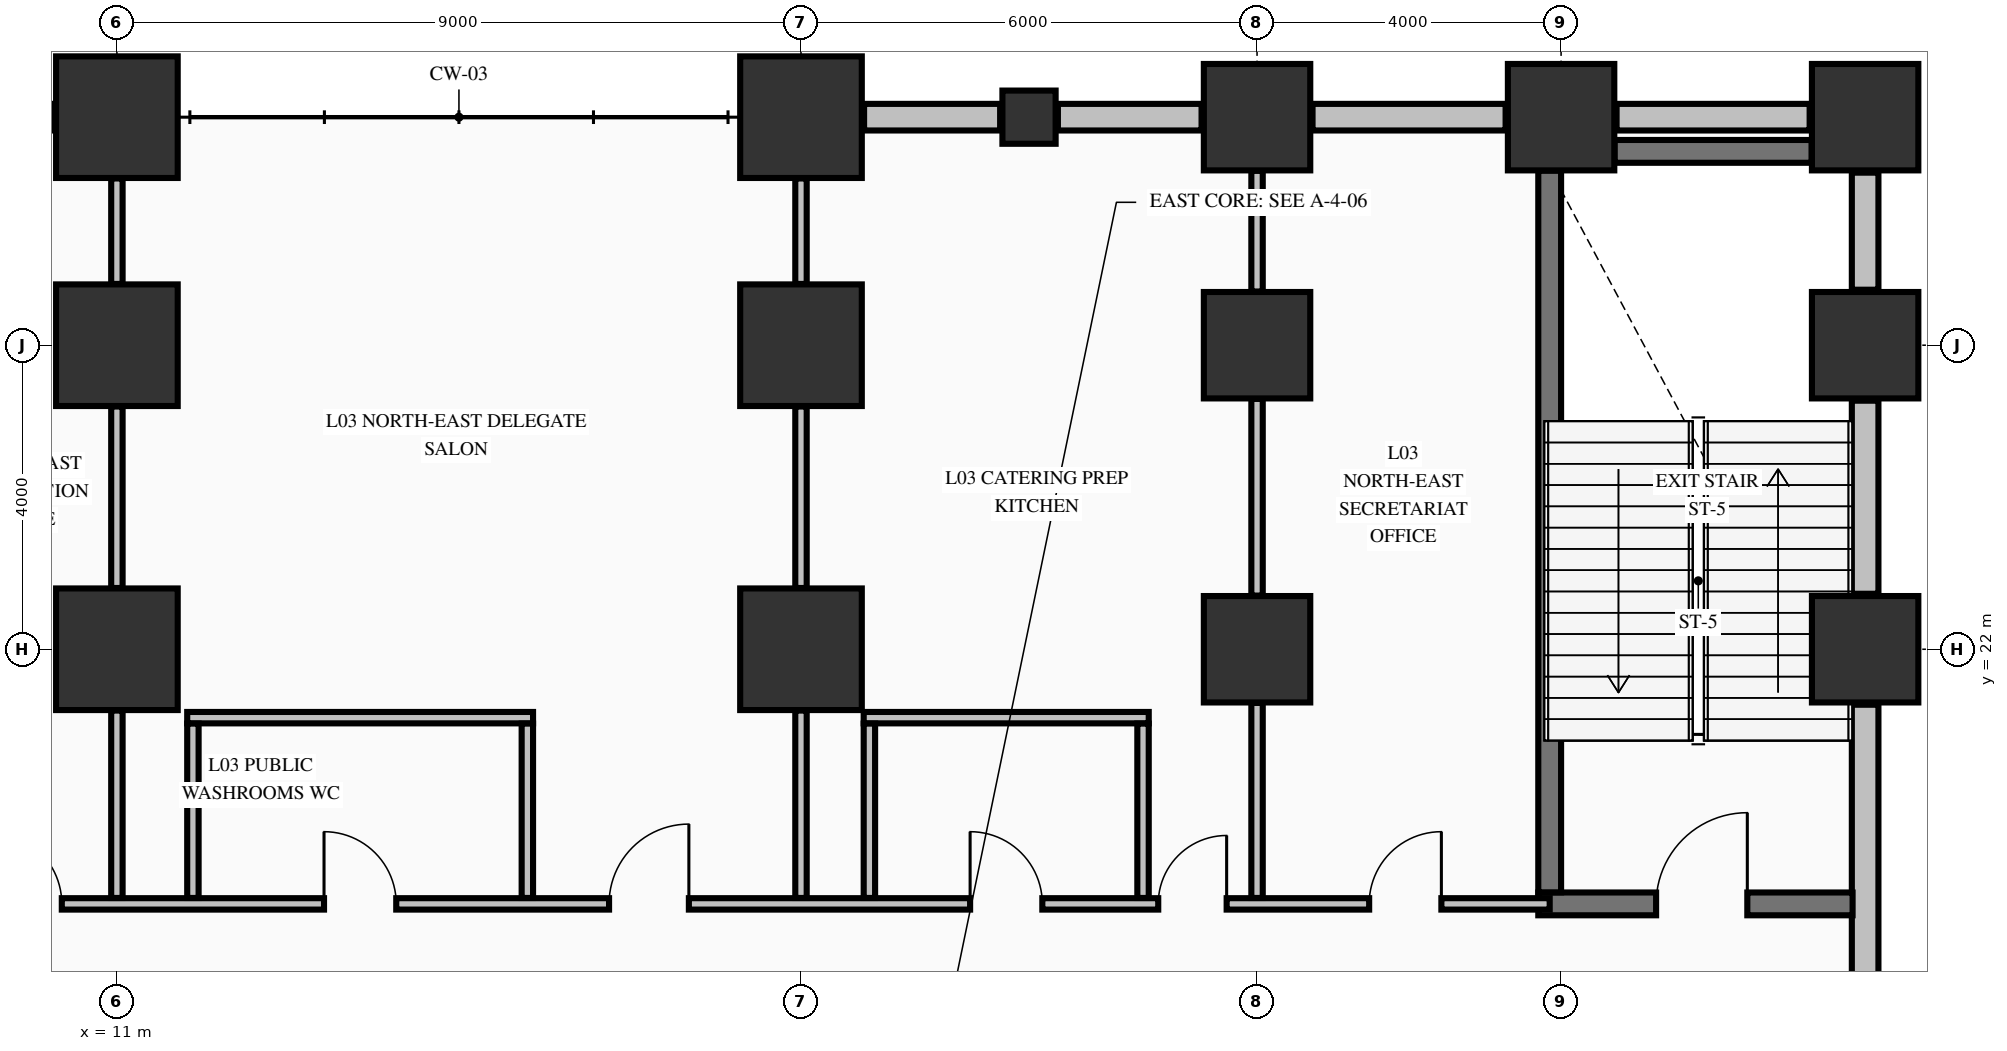
"""IFC4 building model, lengths in metres.
Left out: names, types, materials, properties, quantities, classifications, styles, units other than length and angle.
Written with IfcOpenShell. Run it as: python <this file> out.ifc"""

import sys

from ifc_helpers import new_model, si_unit, direction, frame, frame_2d, origin, origin_2d, place, context, subcontext, project, spatial, rectangle, extrude, element, fill, save


model = new_model("IFC4")
c1 = context("Model", 3, precision=1e-05, world=origin(), true_north=direction((0.0, 1.0)))
c2 = subcontext(c1, "Body", "Model", "MODEL_VIEW")
j1 = project(units=[si_unit("LENGTHUNIT", "METRE"), si_unit("PLANEANGLEUNIT", "RADIAN")], contexts=[c1])
p1 = place(None, origin())
s1 = spatial("IfcSite", under=j1, at=p1, CompositionType="ELEMENT")
p2 = place(p1, origin())
s2 = spatial("IfcBuilding", under=s1, at=p2, CompositionType="ELEMENT")
p3 = place(p2, frame((0.0, 0.0, 16.32)))
s3 = spatial("IfcBuildingStorey", under=s2, at=p3, CompositionType="ELEMENT", Elevation=16.32)
for number, where, z_axis, x_axis in (
    (1, (11.0, 22.0, 0.0), (0.0, 0.0, 1.0), (1.0, 0.0, 0.0)),
    (2, (11.0, 26.0, 0.0), (0.0, 0.0, 1.0), (1.0, 0.0, 0.0)),
    (3, (11.0, 29.0, 0.0), (0.0, 0.0, 1.0), (1.0, 0.0, 0.0)),
    (4, (20.0, 22.0, 0.0), (0.0, 0.0, 1.0), (1.0, 0.0, 0.0)),
    (5, (20.0, 26.0, 0.0), (0.0, 0.0, 1.0), (1.0, 0.0, 0.0)),
    (6, (20.0, 29.0, 0.0), (0.0, 0.0, 1.0), (1.0, 0.0, 0.0)),
):
    element("IfcColumn", number, at=place(p3, frame(where, z_axis=z_axis, x_axis=x_axis)), inside=s3, PredefinedType="COLUMN", context=c2, shape_type="SweptSolid", body=[
        extrude(rectangle(XDim=1.6, YDim=1.6, at=origin_2d()), origin(), (0.0, 0.0, 1.0), 4.99),
    ])
for number, where, z_axis, x_axis in (
    (7, (26.0, 22.0, 0.0), (0.0, 0.0, 1.0), (1.0, 0.0, 0.0)),
    (8, (26.0, 26.0, 0.0), (0.0, 0.0, 1.0), (1.0, 0.0, 0.0)),
    (9, (26.0, 29.0, 0.0), (0.0, 0.0, 1.0), (1.0, 0.0, 0.0)),
    (10, (30.0, 29.0, 0.0), (0.0, 0.0, 1.0), (1.0, 0.0, 0.0)),
    (11, (34.0, 22.0, 0.0), (0.0, 0.0, 1.0), (1.0, 0.0, 0.0)),
    (12, (34.0, 26.0, 0.0), (0.0, 0.0, 1.0), (1.0, 0.0, 0.0)),
    (13, (34.0, 29.0, 0.0), (0.0, 0.0, 1.0), (1.0, 0.0, 0.0)),
):
    element("IfcColumn", number, at=place(p3, frame(where, z_axis=z_axis, x_axis=x_axis)), inside=s3, PredefinedType="COLUMN", context=c2, shape_type="SweptSolid", body=[
        extrude(rectangle(XDim=1.4, YDim=1.4, at=origin_2d()), origin(), (0.0, 0.0, 1.0), 4.99),
    ])
p4 = place(p3, frame((23.0, 29.0, 0.0), z_axis=(0.0, 0.0, 1.0), x_axis=(1.0, 0.0, 0.0)))
e14 = element("IfcColumn", 14, at=p4, inside=s3, PredefinedType="PILASTER", context=c2, shape_type="SweptSolid", body=[
    extrude(rectangle(XDim=0.7, YDim=0.7, at=origin_2d()), origin(), (0.0, 0.0, 1.0), 4.99),
])
p5 = place(p3, frame((10.17, 29.0, 0.0), z_axis=(0.0, 0.0, 1.0), x_axis=(-1.0, 0.0, 0.0)))
e15 = element("IfcWall", 15, at=p5, inside=s3, PredefinedType="STANDARD", context=c2, shape_type="SweptSolid", body=[
    extrude(rectangle(XDim=0.94, YDim=0.35, at=frame_2d((0.47, 0.0))), origin(), (0.0, 0.0, 1.0), 3.332),
])
p6 = place(p3, frame((22.62, 29.0, 0.0), z_axis=(0.0, 0.0, 1.0), x_axis=(-1.0, 0.0, 0.0)))
e16 = element("IfcWall", 16, at=p6, inside=s3, PredefinedType="STANDARD", context=c2, shape_type="SweptSolid", body=[
    extrude(rectangle(XDim=1.79, YDim=0.35, at=frame_2d((0.895, 0.0))), origin(), (0.0, 0.0, 1.0), 3.332),
])
p7 = place(p3, frame((25.27, 29.0, 0.0), z_axis=(0.0, 0.0, 1.0), x_axis=(-1.0, 0.0, 0.0)))
e17 = element("IfcWall", 17, at=p7, inside=s3, PredefinedType="STANDARD", context=c2, shape_type="SweptSolid", body=[
    extrude(rectangle(XDim=1.89, YDim=0.35, at=frame_2d((0.945, 0.0))), origin(), (0.0, 0.0, 1.0), 3.332),
])
for number, where, z_axis, x_axis in (
    (18, (29.27, 29.0, 0.0), (0.0, 0.0, 1.0), (-1.0, 0.0, 0.0)),
    (19, (33.27, 29.0, 0.0), (0.0, 0.0, 1.0), (-1.0, 0.0, 0.0)),
):
    element("IfcWall", number, at=place(p3, frame(where, z_axis=z_axis, x_axis=x_axis)), inside=s3, PredefinedType="STANDARD", context=c2, shape_type="SweptSolid", body=[
        extrude(rectangle(XDim=2.54, YDim=0.35, at=frame_2d((1.27, 0.0))), origin(), (0.0, 0.0, 1.0), 3.332),
    ])
p8 = place(p3, frame((34.0, 21.27, 0.0), z_axis=(0.0, 0.0, 1.0), x_axis=(0.0, -1.0, 0.0)))
e20 = element("IfcWall", 20, at=p8, inside=s3, PredefinedType="STANDARD", context=c2, shape_type="SweptSolid", body=[
    extrude(rectangle(XDim=4.54, YDim=0.35, at=frame_2d((2.27, 0.0))), origin(), (0.0, 0.0, 1.0), 4.99),
])
p9 = place(p3, frame((34.0, 25.27, 0.0), z_axis=(0.0, 0.0, 1.0), x_axis=(0.0, -1.0, 0.0)))
e21 = element("IfcWall", 21, at=p9, inside=s3, PredefinedType="STANDARD", context=c2, shape_type="SweptSolid", body=[
    extrude(rectangle(XDim=2.54, YDim=0.35, at=frame_2d((1.27, 0.0))), origin(), (0.0, 0.0, 1.0), 4.99),
])
p10 = place(p3, frame((34.0, 28.27, 0.0), z_axis=(0.0, 0.0, 1.0), x_axis=(0.0, -1.0, 0.0)))
e22 = element("IfcWall", 22, at=p10, inside=s3, PredefinedType="STANDARD", context=c2, shape_type="SweptSolid", body=[
    extrude(rectangle(XDim=1.54, YDim=0.35, at=frame_2d((0.77, 0.0))), origin(), (0.0, 0.0, 1.0), 4.99),
])
p11 = place(p3, frame((29.7, 18.65, 0.0), z_axis=(0.0, 0.0, 1.0), x_axis=(1.0, 0.0, 0.0)))
e23 = element("IfcWall", 23, at=p11, inside=s3, PredefinedType="SHEAR", context=c2, shape_type="SweptSolid", body=[
    extrude(rectangle(XDim=4.135, YDim=0.3, at=frame_2d((2.067, 0.0))), origin(), (0.0, 0.0, 1.0), 4.99),
])
p12 = place(p11, frame((1.55, 0.0, 0.0)))
e24 = element("IfcOpeningElement", 24, at=p12, cuts=e23, PredefinedType="OPENING", context=c2, shape_type="SweptSolid", body=[
    extrude(rectangle(XDim=1.2, YDim=2.15, at=frame_2d((0.6, 1.075))), frame((0.0, 0.16, 0.0), z_axis=(0.0, -1.0, 0.0), x_axis=(1.0, 0.0, 0.0)), (0.0, 0.0, 1.0), 0.32),
])
p13 = place(p3, frame((30.704, 28.55, 0.0), z_axis=(0.0, 0.0, 1.0), x_axis=(1.0, 0.0, 0.0)))
e25 = element("IfcWall", 25, at=p13, inside=s3, PredefinedType="SHEAR", context=c2, shape_type="SweptSolid", body=[
    extrude(rectangle(XDim=2.592, YDim=0.3, at=frame_2d((1.296, 0.0))), origin(), (0.0, 0.0, 1.0), 4.99),
])
p14 = place(p3, frame((-33.835, 18.65, 0.0), z_axis=(0.0, 0.0, 1.0), x_axis=(1.0, 0.0, 0.0)))
e26 = element("IfcWall", 26, at=p14, inside=s3, PredefinedType="PARTITIONING", context=c2, shape_type="SweptSolid", body=[
    extrude(rectangle(XDim=63.685, YDim=0.15, at=frame_2d((31.843, 0.0))), origin(), (0.0, 0.0, 1.0), 4.99),
])
p15 = place(p14, frame((1.285, 0.0, 0.0)))
e27 = element("IfcOpeningElement", 27, at=p15, cuts=e26, PredefinedType="OPENING", context=c2, shape_type="SweptSolid", body=[
    extrude(rectangle(XDim=1.1, YDim=2.15, at=frame_2d((0.55, 1.075))), frame((0.0, 0.085, 0.0), z_axis=(0.0, -1.0, 0.0), x_axis=(1.0, 0.0, 0.0)), (0.0, 0.0, 1.0), 0.17),
])
p16 = place(p14, frame((5.285, 0.0, 0.0)))
e28 = element("IfcOpeningElement", 28, at=p16, cuts=e26, PredefinedType="OPENING", context=c2, shape_type="SweptSolid", body=[
    extrude(rectangle(XDim=1.1, YDim=2.15, at=frame_2d((0.55, 1.075))), frame((0.0, 0.085, 0.0), z_axis=(0.0, -1.0, 0.0), x_axis=(1.0, 0.0, 0.0)), (0.0, 0.0, 1.0), 0.17),
])
p17 = place(p14, frame((8.785, 0.0, 0.0)))
e29 = element("IfcOpeningElement", 29, at=p17, cuts=e26, PredefinedType="OPENING", context=c2, shape_type="SweptSolid", body=[
    extrude(rectangle(XDim=1.1, YDim=2.15, at=frame_2d((0.55, 1.075))), frame((0.0, 0.085, 0.0), z_axis=(0.0, -1.0, 0.0), x_axis=(1.0, 0.0, 0.0)), (0.0, 0.0, 1.0), 0.17),
])
p18 = place(p14, frame((11.785, 0.0, 0.0)))
e30 = element("IfcOpeningElement", 30, at=p18, cuts=e26, PredefinedType="OPENING", context=c2, shape_type="SweptSolid", body=[
    extrude(rectangle(XDim=1.1, YDim=2.15, at=frame_2d((0.55, 1.075))), frame((0.0, 0.085, 0.0), z_axis=(0.0, -1.0, 0.0), x_axis=(1.0, 0.0, 0.0)), (0.0, 0.0, 1.0), 0.17),
])
p19 = place(p14, frame((15.535, 0.0, 0.0)))
e31 = element("IfcOpeningElement", 31, at=p19, cuts=e26, PredefinedType="OPENING", context=c2, shape_type="SweptSolid", body=[
    extrude(rectangle(XDim=1.1, YDim=2.15, at=frame_2d((0.55, 1.075))), frame((0.0, 0.085, 0.0), z_axis=(0.0, -1.0, 0.0), x_axis=(1.0, 0.0, 0.0)), (0.0, 0.0, 1.0), 0.17),
])
p20 = place(p14, frame((20.035, 0.0, 0.0)))
e32 = element("IfcOpeningElement", 32, at=p20, cuts=e26, PredefinedType="OPENING", context=c2, shape_type="SweptSolid", body=[
    extrude(rectangle(XDim=1.1, YDim=2.15, at=frame_2d((0.55, 1.075))), frame((0.0, 0.085, 0.0), z_axis=(0.0, -1.0, 0.0), x_axis=(1.0, 0.0, 0.0)), (0.0, 0.0, 1.0), 0.17),
])
p21 = place(p14, frame((23.56, 0.0, 0.0)))
e33 = element("IfcOpeningElement", 33, at=p21, cuts=e26, PredefinedType="OPENING", context=c2, shape_type="SweptSolid", body=[
    extrude(rectangle(XDim=0.95, YDim=2.15, at=frame_2d((0.475, 1.075))), frame((0.0, 0.085, 0.0), z_axis=(0.0, -1.0, 0.0), x_axis=(1.0, 0.0, 0.0)), (0.0, 0.0, 1.0), 0.17),
])
p22 = place(p14, frame((28.985, 0.0, 0.0)))
e34 = element("IfcOpeningElement", 34, at=p22, cuts=e26, PredefinedType="OPENING", context=c2, shape_type="SweptSolid", body=[
    extrude(rectangle(XDim=1.1, YDim=2.15, at=frame_2d((0.55, 1.075))), frame((0.0, 0.085, 0.0), z_axis=(0.0, -1.0, 0.0), x_axis=(1.0, 0.0, 0.0)), (0.0, 0.0, 1.0), 0.17),
])
p23 = place(p14, frame((37.585, 0.0, 0.0)))
e35 = element("IfcOpeningElement", 35, at=p23, cuts=e26, PredefinedType="OPENING", context=c2, shape_type="SweptSolid", body=[
    extrude(rectangle(XDim=1.1, YDim=2.15, at=frame_2d((0.55, 1.075))), frame((0.0, 0.085, 0.0), z_axis=(0.0, -1.0, 0.0), x_axis=(1.0, 0.0, 0.0)), (0.0, 0.0, 1.0), 0.17),
])
p24 = place(p14, frame((43.16, 0.0, 0.0)))
e36 = element("IfcOpeningElement", 36, at=p24, cuts=e26, PredefinedType="OPENING", context=c2, shape_type="SweptSolid", body=[
    extrude(rectangle(XDim=0.95, YDim=2.15, at=frame_2d((0.475, 1.075))), frame((0.0, 0.085, 0.0), z_axis=(0.0, -1.0, 0.0), x_axis=(1.0, 0.0, 0.0)), (0.0, 0.0, 1.0), 0.17),
])
p25 = place(p14, frame((61.31, 0.0, 0.0)))
e37 = element("IfcOpeningElement", 37, at=p25, cuts=e26, PredefinedType="OPENING", context=c2, shape_type="SweptSolid", body=[
    extrude(rectangle(XDim=0.95, YDim=2.15, at=frame_2d((0.475, 1.075))), frame((0.0, 0.085, 0.0), z_axis=(0.0, -1.0, 0.0), x_axis=(1.0, 0.0, 0.0)), (0.0, 0.0, 1.0), 0.17),
])
p26 = place(p14, frame((47.56, 0.0, 0.0)))
e38 = element("IfcOpeningElement", 38, at=p26, cuts=e26, PredefinedType="OPENING", context=c2, shape_type="SweptSolid", body=[
    extrude(rectangle(XDim=0.95, YDim=2.15, at=frame_2d((0.475, 1.075))), frame((0.0, 0.085, 0.0), z_axis=(0.0, -1.0, 0.0), x_axis=(1.0, 0.0, 0.0)), (0.0, 0.0, 1.0), 0.17),
])
p27 = place(p14, frame((51.31, 0.0, 0.0)))
e39 = element("IfcOpeningElement", 39, at=p27, cuts=e26, PredefinedType="OPENING", context=c2, shape_type="SweptSolid", body=[
    extrude(rectangle(XDim=1.05, YDim=2.15, at=frame_2d((0.525, 1.075))), frame((0.0, 0.085, 0.0), z_axis=(0.0, -1.0, 0.0), x_axis=(1.0, 0.0, 0.0)), (0.0, 0.0, 1.0), 0.17),
])
p28 = place(p14, frame((56.06, 0.0, 0.0)))
e40 = element("IfcOpeningElement", 40, at=p28, cuts=e26, PredefinedType="OPENING", context=c2, shape_type="SweptSolid", body=[
    extrude(rectangle(XDim=0.95, YDim=2.15, at=frame_2d((0.475, 1.075))), frame((0.0, 0.085, 0.0), z_axis=(0.0, -1.0, 0.0), x_axis=(1.0, 0.0, 0.0)), (0.0, 0.0, 1.0), 0.17),
])
p29 = place(p14, frame((58.535, 0.0, 0.0)))
e41 = element("IfcOpeningElement", 41, at=p29, cuts=e26, PredefinedType="OPENING", context=c2, shape_type="SweptSolid", body=[
    extrude(rectangle(XDim=0.9, YDim=2.15, at=frame_2d((0.45, 1.075))), frame((0.0, 0.085, 0.0), z_axis=(0.0, -1.0, 0.0), x_axis=(1.0, 0.0, 0.0)), (0.0, 0.0, 1.0), 0.17),
])
p30 = place(p3, frame((11.925, 21.1, 0.0), z_axis=(0.0, 0.0, 1.0), x_axis=(1.0, 0.0, 0.0)))
e42 = element("IfcWall", 42, at=p30, inside=s3, PredefinedType="PARTITIONING", context=c2, shape_type="SweptSolid", body=[
    extrude(rectangle(XDim=4.55, YDim=0.15, at=frame_2d((2.275, 0.0))), origin(), (0.0, 0.0, 1.0), 4.99),
])
p31 = place(p3, frame((20.825, 21.1, 0.0), z_axis=(0.0, 0.0, 1.0), x_axis=(1.0, 0.0, 0.0)))
e43 = element("IfcWall", 43, at=p31, inside=s3, PredefinedType="PARTITIONING", context=c2, shape_type="SweptSolid", body=[
    extrude(rectangle(XDim=3.75, YDim=0.15, at=frame_2d((1.875, 0.0))), origin(), (0.0, 0.0, 1.0), 4.99),
])
p32 = place(p3, frame((29.85, 18.802, 0.0), z_axis=(0.0, 0.0, 1.0), x_axis=(0.0, 1.0, 0.0)))
e44 = element("IfcWall", 44, at=p32, inside=s3, PredefinedType="SHEAR", context=c2, shape_type="SweptSolid", body=[
    extrude(rectangle(XDim=9.494, YDim=0.3, at=frame_2d((4.747, 0.0))), origin(), (0.0, 0.0, 1.0), 4.99),
])
p33 = place(p3, frame((11.0, 18.728, 0.0), z_axis=(0.0, 0.0, 1.0), x_axis=(0.0, 1.0, 0.0)))
e45 = element("IfcWall", 45, at=p33, inside=s3, PredefinedType="PARTITIONING", context=c2, shape_type="SweptSolid", body=[
    extrude(rectangle(XDim=2.466, YDim=0.15, at=frame_2d((1.233, 0.0))), origin(), (0.0, 0.0, 1.0), 3.332),
])
p34 = place(p3, frame((11.0, 22.806, 0.0), z_axis=(0.0, 0.0, 1.0), x_axis=(0.0, 1.0, 0.0)))
e46 = element("IfcWall", 46, at=p34, inside=s3, PredefinedType="PARTITIONING", context=c2, shape_type="SweptSolid", body=[
    extrude(rectangle(XDim=2.388, YDim=0.15, at=frame_2d((1.194, 0.0))), origin(), (0.0, 0.0, 1.0), 3.332),
])
p35 = place(p3, frame((11.0, 26.806, 0.0), z_axis=(0.0, 0.0, 1.0), x_axis=(0.0, 1.0, 0.0)))
e47 = element("IfcWall", 47, at=p35, inside=s3, PredefinedType="PARTITIONING", context=c2, shape_type="SweptSolid", body=[
    extrude(rectangle(XDim=1.388, YDim=0.15, at=frame_2d((0.694, 0.0))), origin(), (0.0, 0.0, 1.0), 3.332),
])
for number, where, z_axis, x_axis in (
    (48, (12.0, 18.728, 0.0), (0.0, 0.0, 1.0), (0.0, 1.0, 0.0)),
    (49, (16.4, 18.728, 0.0), (0.0, 0.0, 1.0), (0.0, 1.0, 0.0)),
):
    element("IfcWall", number, at=place(p3, frame(where, z_axis=z_axis, x_axis=x_axis)), inside=s3, PredefinedType="PARTITIONING", context=c2, shape_type="SweptSolid", body=[
        extrude(rectangle(XDim=2.294, YDim=0.15, at=frame_2d((1.147, 0.0))), origin(), (0.0, 0.0, 1.0), 4.99),
    ])
p36 = place(p3, frame((20.0, 18.728, 0.0), z_axis=(0.0, 0.0, 1.0), x_axis=(0.0, 1.0, 0.0)))
e50 = element("IfcWall", 50, at=p36, inside=s3, PredefinedType="PARTITIONING", context=c2, shape_type="SweptSolid", body=[
    extrude(rectangle(XDim=2.466, YDim=0.15, at=frame_2d((1.233, 0.0))), origin(), (0.0, 0.0, 1.0), 3.332),
])
p37 = place(p3, frame((20.0, 22.806, 0.0), z_axis=(0.0, 0.0, 1.0), x_axis=(0.0, 1.0, 0.0)))
e51 = element("IfcWall", 51, at=p37, inside=s3, PredefinedType="PARTITIONING", context=c2, shape_type="SweptSolid", body=[
    extrude(rectangle(XDim=2.388, YDim=0.15, at=frame_2d((1.194, 0.0))), origin(), (0.0, 0.0, 1.0), 3.332),
])
p38 = place(p3, frame((20.0, 26.806, 0.0), z_axis=(0.0, 0.0, 1.0), x_axis=(0.0, 1.0, 0.0)))
e52 = element("IfcWall", 52, at=p38, inside=s3, PredefinedType="PARTITIONING", context=c2, shape_type="SweptSolid", body=[
    extrude(rectangle(XDim=1.388, YDim=0.15, at=frame_2d((0.694, 0.0))), origin(), (0.0, 0.0, 1.0), 3.332),
])
for number, where, z_axis, x_axis in (
    (53, (20.9, 18.728, 0.0), (0.0, 0.0, 1.0), (0.0, 1.0, 0.0)),
    (54, (24.5, 18.728, 0.0), (0.0, 0.0, 1.0), (0.0, 1.0, 0.0)),
):
    element("IfcWall", number, at=place(p3, frame(where, z_axis=z_axis, x_axis=x_axis)), inside=s3, PredefinedType="PARTITIONING", context=c2, shape_type="SweptSolid", body=[
        extrude(rectangle(XDim=2.294, YDim=0.15, at=frame_2d((1.147, 0.0))), origin(), (0.0, 0.0, 1.0), 4.99),
    ])
p39 = place(p3, frame((26.0, 18.728, 0.0), z_axis=(0.0, 0.0, 1.0), x_axis=(0.0, 1.0, 0.0)))
e55 = element("IfcWall", 55, at=p39, inside=s3, PredefinedType="PARTITIONING", context=c2, shape_type="SweptSolid", body=[
    extrude(rectangle(XDim=2.566, YDim=0.15, at=frame_2d((1.283, 0.0))), origin(), (0.0, 0.0, 1.0), 3.332),
])
p40 = place(p3, frame((26.0, 22.706, 0.0), z_axis=(0.0, 0.0, 1.0), x_axis=(0.0, 1.0, 0.0)))
e56 = element("IfcWall", 56, at=p40, inside=s3, PredefinedType="PARTITIONING", context=c2, shape_type="SweptSolid", body=[
    extrude(rectangle(XDim=2.588, YDim=0.15, at=frame_2d((1.294, 0.0))), origin(), (0.0, 0.0, 1.0), 3.332),
])
p41 = place(p3, frame((26.0, 26.706, 0.0), z_axis=(0.0, 0.0, 1.0), x_axis=(0.0, 1.0, 0.0)))
e57 = element("IfcWall", 57, at=p41, inside=s3, PredefinedType="PARTITIONING", context=c2, shape_type="SweptSolid", body=[
    extrude(rectangle(XDim=1.588, YDim=0.15, at=frame_2d((0.794, 0.0))), origin(), (0.0, 0.0, 1.0), 3.332),
])
p42 = place(p12, origin())
e58 = element("IfcDoor", 58, at=p42, inside=s3, OperationType="SINGLE_SWING_RIGHT", PredefinedType="DOOR", context=c2, shape_type="SweptSolid", body=[
    extrude(rectangle(XDim=1.2, YDim=2.15, at=frame_2d((0.6, 1.075))), frame((0.0, 0.025, 0.0), z_axis=(0.0, -1.0, 0.0), x_axis=(1.0, 0.0, 0.0)), (0.0, 0.0, 1.0), 0.05),
])
fill(e24, e58)
p43 = place(p24, origin())
e59 = element("IfcDoor", 59, at=p43, inside=s3, OperationType="SINGLE_SWING_LEFT", PredefinedType="DOOR", context=c2, shape_type="SweptSolid", body=[
    extrude(rectangle(XDim=0.95, YDim=2.15, at=frame_2d((0.475, 1.075))), frame((0.0, 0.025, 0.0), z_axis=(0.0, -1.0, 0.0), x_axis=(1.0, 0.0, 0.0)), (0.0, 0.0, 1.0), 0.05),
])
fill(e36, e59)
p44 = place(p25, origin())
e60 = element("IfcDoor", 60, at=p44, inside=s3, OperationType="SINGLE_SWING_RIGHT", PredefinedType="DOOR", context=c2, shape_type="SweptSolid", body=[
    extrude(rectangle(XDim=0.95, YDim=2.15, at=frame_2d((0.475, 1.075))), frame((0.0, 0.025, 0.0), z_axis=(0.0, -1.0, 0.0), x_axis=(1.0, 0.0, 0.0)), (0.0, 0.0, 1.0), 0.05),
])
fill(e37, e60)
p45 = place(p26, origin())
e61 = element("IfcDoor", 61, at=p45, inside=s3, OperationType="SINGLE_SWING_LEFT", PredefinedType="DOOR", context=c2, shape_type="SweptSolid", body=[
    extrude(rectangle(XDim=0.95, YDim=2.15, at=frame_2d((0.475, 1.075))), frame((0.0, 0.025, 0.0), z_axis=(0.0, -1.0, 0.0), x_axis=(1.0, 0.0, 0.0)), (0.0, 0.0, 1.0), 0.05),
])
fill(e38, e61)
p46 = place(p27, origin())
e62 = element("IfcDoor", 62, at=p46, inside=s3, OperationType="SINGLE_SWING_RIGHT", PredefinedType="DOOR", context=c2, shape_type="SweptSolid", body=[
    extrude(rectangle(XDim=1.05, YDim=2.15, at=frame_2d((0.525, 1.075))), frame((0.0, 0.025, 0.0), z_axis=(0.0, -1.0, 0.0), x_axis=(1.0, 0.0, 0.0)), (0.0, 0.0, 1.0), 0.05),
])
fill(e39, e62)
p47 = place(p28, origin())
e63 = element("IfcDoor", 63, at=p47, inside=s3, OperationType="SINGLE_SWING_LEFT", PredefinedType="DOOR", context=c2, shape_type="SweptSolid", body=[
    extrude(rectangle(XDim=0.95, YDim=2.15, at=frame_2d((0.475, 1.075))), frame((0.0, 0.025, 0.0), z_axis=(0.0, -1.0, 0.0), x_axis=(1.0, 0.0, 0.0)), (0.0, 0.0, 1.0), 0.05),
])
fill(e40, e63)
p48 = place(p29, origin())
e64 = element("IfcDoor", 64, at=p48, inside=s3, OperationType="SINGLE_SWING_RIGHT", PredefinedType="DOOR", context=c2, shape_type="SweptSolid", body=[
    extrude(rectangle(XDim=0.9, YDim=2.15, at=frame_2d((0.45, 1.075))), frame((0.0, 0.025, 0.0), z_axis=(0.0, -1.0, 0.0), x_axis=(1.0, 0.0, 0.0)), (0.0, 0.0, 1.0), 0.05),
])
fill(e41, e64)
save(model, sys.argv[1])
